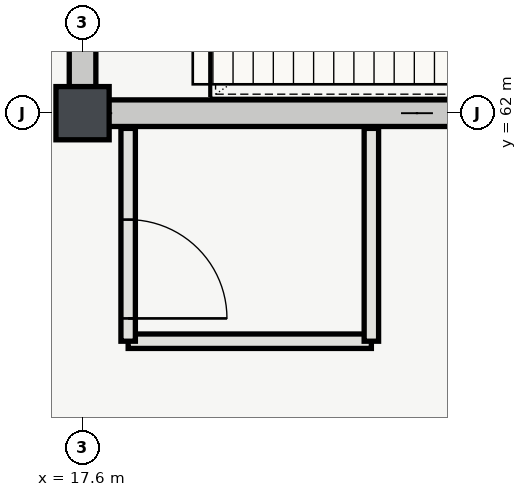
"""IFC4 building model, lengths in metres.
Left out: names, types, materials, properties, quantities, classifications, styles, units other than length and angle.
Written with IfcOpenShell. Run it as: python <this file> out.ifc"""

import sys

from ifc_helpers import new_model, si_unit, direction, frame, frame_2d, origin, origin_2d, place, context, subcontext, project, spatial, rectangle, extrude, element, fill, save


model = new_model("IFC4")
c1 = context("Model", 3, precision=1e-05, world=origin(), true_north=direction((0.0, 1.0)))
c2 = subcontext(c1, "Body", "Model", "MODEL_VIEW")
j1 = project(units=[si_unit("LENGTHUNIT", "METRE"), si_unit("PLANEANGLEUNIT", "RADIAN")], contexts=[c1])
p1 = place(None, origin())
s1 = spatial("IfcSite", under=j1, at=p1, CompositionType="ELEMENT")
p2 = place(p1, origin())
s2 = spatial("IfcBuilding", under=s1, at=p2, CompositionType="ELEMENT")
p3 = place(p2, frame((0.0, 0.0, 10.8)))
s3 = spatial("IfcBuildingStorey", under=s2, at=p3, CompositionType="ELEMENT", Elevation=10.8)
p4 = place(p3, frame((17.6, 62.0, 0.0), z_axis=(0.0, 0.0, 1.0), x_axis=(1.0, 0.0, 0.0)))
e1 = element("IfcColumn", 1, at=p4, inside=s3, PredefinedType="COLUMN", context=c2, shape_type="SweptSolid", body=[
    extrude(rectangle(XDim=0.7, YDim=0.7, at=origin_2d()), origin(), (0.0, 0.0, 1.0), 5.4),
])
p5 = place(p3, frame((17.425, 62.0, 0.0), z_axis=(0.0, 0.0, 1.0), x_axis=(1.0, 0.0, 0.0)))
e2 = element("IfcWall", 2, at=p5, inside=s3, PredefinedType="SHEAR", context=c2, shape_type="SweptSolid", body=[
    extrude(rectangle(XDim=9.15, YDim=0.35, at=frame_2d((4.575, 0.0))), origin(), (0.0, 0.0, 1.0), 5.12),
])
p6 = place(p3, frame((17.6, 62.175, 0.0), z_axis=(0.0, 0.0, 1.0), x_axis=(0.0, 1.0, 0.0)))
e3 = element("IfcWall", 3, at=p6, inside=s3, PredefinedType="SHEAR", context=c2, shape_type="SweptSolid", body=[
    extrude(rectangle(XDim=7.65, YDim=0.35, at=frame_2d((3.825, 0.0))), origin(), (0.0, 0.0, 1.0), 5.12),
])
p7 = place(p6, frame((1.625, 0.0, 0.0)))
e4 = element("IfcOpeningElement", 4, at=p7, cuts=e3, PredefinedType="OPENING", context=c2, shape_type="SweptSolid", body=[
    extrude(rectangle(XDim=1.4, YDim=2.2, at=frame_2d((0.7, 1.1))), frame((0.0, 0.185, 0.0), z_axis=(0.0, -1.0, 0.0), x_axis=(1.0, 0.0, 0.0)), (0.0, 0.0, 1.0), 0.37),
])
p8 = place(p6, frame((5.675, 0.0, 0.0)))
e5 = element("IfcOpeningElement", 5, at=p8, cuts=e3, PredefinedType="OPENING", context=c2, shape_type="SweptSolid", body=[
    extrude(rectangle(XDim=1.0, YDim=2.15, at=frame_2d((0.5, 1.075))), frame((0.0, 0.185, 0.0), z_axis=(0.0, -1.0, 0.0), x_axis=(1.0, 0.0, 0.0)), (0.0, 0.0, 1.0), 0.37),
])
p9 = place(p3, frame((18.2, 59.0, 0.0), z_axis=(0.0, 0.0, 1.0), x_axis=(1.0, 0.0, 0.0)))
e6 = element("IfcWall", 6, at=p9, inside=s3, PredefinedType="PARTITIONING", context=c2, shape_type="SweptSolid", body=[
    extrude(rectangle(XDim=3.2, YDim=0.19, at=frame_2d((1.6, 0.0))), origin(), (0.0, 0.0, 1.0), 5.12),
])
p10 = place(p3, frame((18.2, 61.8, 0.0), z_axis=(0.0, 0.0, 1.0), x_axis=(0.0, -1.0, 0.0)))
e7 = element("IfcWall", 7, at=p10, inside=s3, PredefinedType="PARTITIONING", context=c2, shape_type="SweptSolid", body=[
    extrude(rectangle(XDim=2.8, YDim=0.19, at=frame_2d((1.4, 0.0))), origin(), (0.0, 0.0, 1.0), 5.12),
])
p11 = place(p10, frame((1.2, 0.0, 0.0)))
e8 = element("IfcOpeningElement", 8, at=p11, cuts=e7, PredefinedType="OPENING", context=c2, shape_type="SweptSolid", body=[
    extrude(rectangle(XDim=1.3, YDim=2.2, at=frame_2d((0.65, 1.1))), frame((0.0, 0.105, 0.0), z_axis=(0.0, -1.0, 0.0), x_axis=(1.0, 0.0, 0.0)), (0.0, 0.0, 1.0), 0.21),
])
p12 = place(p3, frame((21.4, 59.0, 0.0), z_axis=(0.0, 0.0, 1.0), x_axis=(0.0, 1.0, 0.0)))
e9 = element("IfcWall", 9, at=p12, inside=s3, PredefinedType="PARTITIONING", context=c2, shape_type="SweptSolid", body=[
    extrude(rectangle(XDim=2.8, YDim=0.19, at=frame_2d((1.4, 0.0))), origin(), (0.0, 0.0, 1.0), 5.12),
])
p13 = place(p11, origin())
e10 = element("IfcDoor", 10, at=p13, inside=s3, OperationType="SINGLE_SWING_RIGHT", PredefinedType="DOOR", context=c2, shape_type="SweptSolid", body=[
    extrude(rectangle(XDim=1.3, YDim=2.2, at=frame_2d((0.65, 1.1))), frame((0.0, 0.025, 0.0), z_axis=(0.0, -1.0, 0.0), x_axis=(1.0, 0.0, 0.0)), (0.0, 0.0, 1.0), 0.05),
])
fill(e8, e10)
save(model, sys.argv[1])
